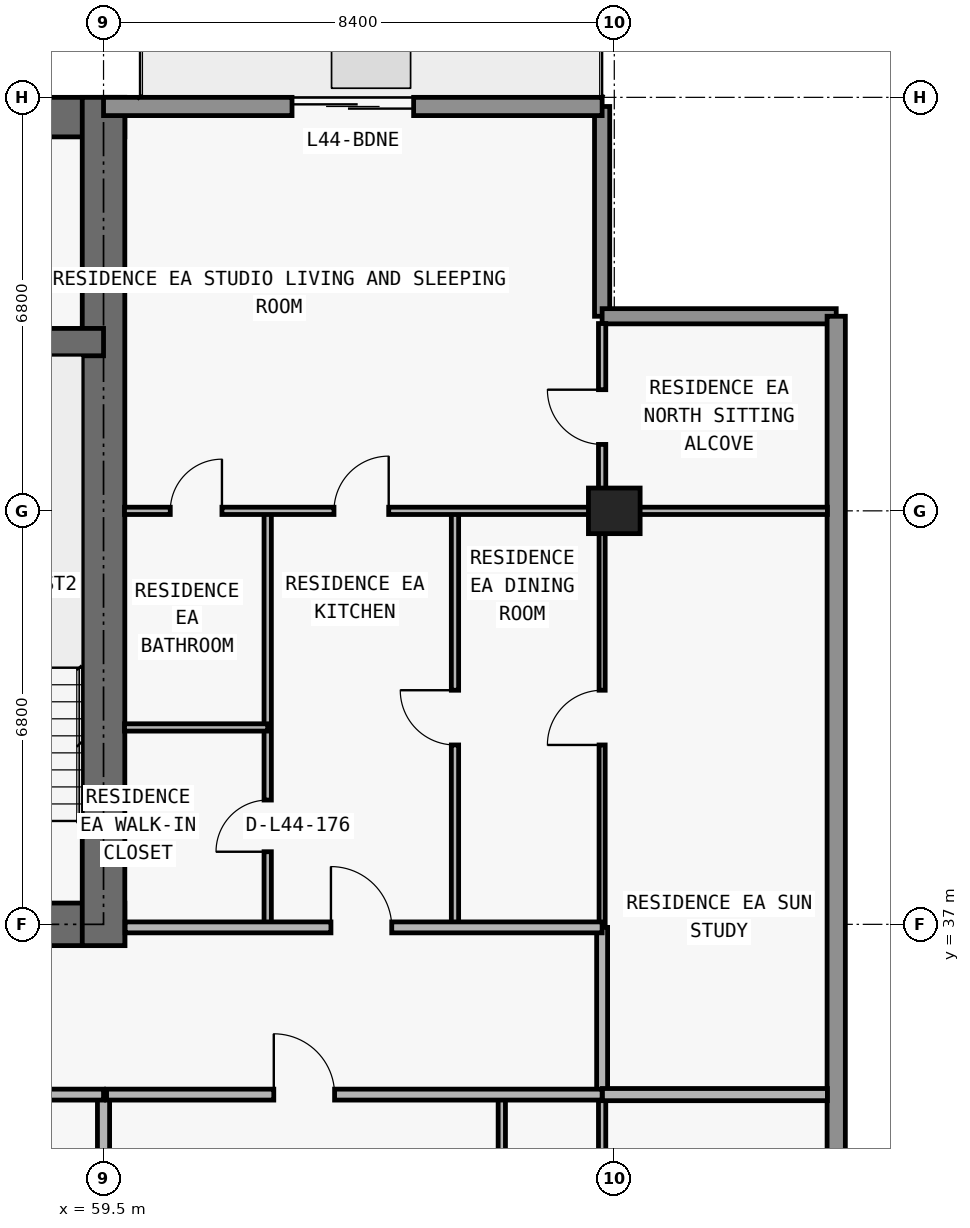
"""IFC4 building model, lengths in metres.
Left out: names, types, materials, properties, quantities, classifications, styles, units other than length and angle.
Written with IfcOpenShell. Run it as: python <this file> out.ifc"""

import sys

from ifc_helpers import new_model, si_unit, direction, frame, frame_2d, origin, origin_2d, place, context, subcontext, project, spatial, rectangle, extrude, element, fill, save


model = new_model("IFC4")
c1 = context("Model", 3, precision=1e-05, world=origin(), true_north=direction((0.0, 1.0)))
c2 = subcontext(c1, "Body", "Model", "MODEL_VIEW")
j1 = project(units=[si_unit("LENGTHUNIT", "METRE"), si_unit("PLANEANGLEUNIT", "RADIAN")], contexts=[c1])
p1 = place(None, origin())
s1 = spatial("IfcSite", under=j1, at=p1, CompositionType="ELEMENT")
p2 = place(p1, origin())
s2 = spatial("IfcBuilding", under=s1, at=p2, CompositionType="ELEMENT")
p3 = place(p2, frame((0.0, 0.0, 160.5)))
s3 = spatial("IfcBuildingStorey", under=s2, at=p3, CompositionType="ELEMENT", Elevation=160.5)
p4 = place(p3, frame((67.9, 43.8, 0.0), z_axis=(0.0, 0.0, 1.0), x_axis=(1.0, 0.0, 0.0)))
e1 = element("IfcColumn", 1, at=p4, inside=s3, PredefinedType="COLUMN", context=c2, shape_type="SweptSolid", body=[
    extrude(rectangle(XDim=0.85, YDim=0.75, at=origin_2d()), origin(), (0.0, 0.0, 1.0), 3.05),
])
p5 = place(p3, frame((17.95, 37.0, 0.0), z_axis=(0.0, 0.0, 1.0), x_axis=(1.0, 0.0, 0.0)))
e2 = element("IfcWall", 2, at=p5, inside=s3, PredefinedType="SHEAR", context=c2, shape_type="SweptSolid", body=[
    extrude(rectangle(XDim=41.9, YDim=0.7, at=frame_2d((20.95, 0.0))), origin(), (0.0, 0.0, 1.0), 3.05),
])
p6 = place(p5, frame((14.35, 0.0, 0.0)))
e3 = element("IfcOpeningElement", 3, at=p6, cuts=e2, PredefinedType="OPENING", context=c2, shape_type="SweptSolid", body=[
    extrude(rectangle(XDim=1.1, YDim=2.15, at=frame_2d((0.55, 1.075))), frame((0.0, 0.36, 0.0), z_axis=(0.0, -1.0, 0.0), x_axis=(1.0, 0.0, 0.0)), (0.0, 0.0, 1.0), 0.72),
])
p7 = place(p5, frame((6.2, 0.0, 0.0)))
e4 = element("IfcOpeningElement", 4, at=p7, cuts=e2, PredefinedType="OPENING", context=c2, shape_type="SweptSolid", body=[
    extrude(rectangle(XDim=1.05, YDim=2.15, at=frame_2d((0.525, 1.075))), frame((0.0, 0.36, 0.0), z_axis=(0.0, -1.0, 0.0), x_axis=(1.0, 0.0, 0.0)), (0.0, 0.0, 1.0), 0.72),
])
p8 = place(p5, frame((34.7, 0.0, 0.0)))
e5 = element("IfcOpeningElement", 5, at=p8, cuts=e2, PredefinedType="OPENING", context=c2, shape_type="SweptSolid", body=[
    extrude(rectangle(XDim=1.05, YDim=2.15, at=frame_2d((0.525, 1.075))), frame((0.0, 0.36, 0.0), z_axis=(0.0, -1.0, 0.0), x_axis=(1.0, 0.0, 0.0)), (0.0, 0.0, 1.0), 0.72),
])
p9 = place(p5, frame((10.812, 0.0, 0.0)))
e6 = element("IfcOpeningElement", 6, at=p9, cuts=e2, PredefinedType="OPENING", context=c2, shape_type="SweptSolid", body=[
    extrude(rectangle(XDim=1.05, YDim=2.15, at=frame_2d((0.525, 1.075))), frame((0.0, 0.36, 0.0), z_axis=(0.0, -1.0, 0.0), x_axis=(1.0, 0.0, 0.0)), (0.0, 0.0, 1.0), 0.72),
])
p10 = place(p5, frame((24.05, 0.0, 0.0)))
e7 = element("IfcOpeningElement", 7, at=p10, cuts=e2, PredefinedType="OPENING", context=c2, shape_type="SweptSolid", body=[
    extrude(rectangle(XDim=1.05, YDim=2.15, at=frame_2d((0.525, 1.075))), frame((0.0, 0.36, 0.0), z_axis=(0.0, -1.0, 0.0), x_axis=(1.0, 0.0, 0.0)), (0.0, 0.0, 1.0), 0.72),
])
p11 = place(p3, frame((17.95, 50.275, 0.0), z_axis=(0.0, 0.0, 1.0), x_axis=(1.0, 0.0, 0.0)))
e8 = element("IfcWall", 8, at=p11, inside=s3, PredefinedType="SHEAR", context=c2, shape_type="SweptSolid", body=[
    extrude(rectangle(XDim=41.9, YDim=0.65, at=frame_2d((20.95, 0.0))), origin(), (0.0, 0.0, 1.0), 3.05),
])
p12 = place(p3, frame((59.5, 36.65, 0.0), z_axis=(0.0, 0.0, 1.0), x_axis=(0.0, 1.0, 0.0)))
e9 = element("IfcWall", 9, at=p12, inside=s3, PredefinedType="SHEAR", context=c2, shape_type="SweptSolid", body=[
    extrude(rectangle(XDim=13.95, YDim=0.7, at=frame_2d((6.975, 0.0))), origin(), (0.0, 0.0, 1.0), 3.05),
])
p13 = place(p3, frame((18.3, 46.575, 0.0), z_axis=(0.0, 0.0, 1.0), x_axis=(1.0, 0.0, 0.0)))
e10 = element("IfcWall", 10, at=p13, inside=s3, PredefinedType="SHEAR", context=c2, shape_type="SweptSolid", body=[
    extrude(rectangle(XDim=41.2, YDim=0.45, at=frame_2d((20.6, 0.0))), origin(), (0.0, 0.0, 1.0), 3.05),
])
p14 = place(p13, frame((7.6, 0.0, 0.0)))
e11 = element("IfcOpeningElement", 11, at=p14, cuts=e10, PredefinedType="OPENING", context=c2, shape_type="SweptSolid", body=[
    extrude(rectangle(XDim=1.0, YDim=2.2, at=frame_2d((0.5, 1.1))), frame((0.0, 0.235, 0.0), z_axis=(0.0, -1.0, 0.0), x_axis=(1.0, 0.0, 0.0)), (0.0, 0.0, 1.0), 0.47),
])
p15 = place(p13, frame((32.625, 0.0, 0.0)))
e12 = element("IfcOpeningElement", 12, at=p15, cuts=e10, PredefinedType="OPENING", context=c2, shape_type="SweptSolid", body=[
    extrude(rectangle(XDim=1.05, YDim=2.15, at=frame_2d((0.525, 1.075))), frame((0.0, 0.235, 0.0), z_axis=(0.0, -1.0, 0.0), x_axis=(1.0, 0.0, 0.0)), (0.0, 0.0, 1.0), 0.47),
])
p16 = place(p3, frame((67.7, 50.45, 0.0), z_axis=(0.0, 0.0, 1.0), x_axis=(0.0, -1.0, 0.0)))
e13 = element("IfcWall", 13, at=p16, inside=s3, PredefinedType="ELEMENTEDWALL", context=c2, shape_type="SweptSolid", body=[
    extrude(rectangle(XDim=3.45, YDim=0.25, at=frame_2d((1.725, 0.0))), origin(), (0.0, 0.0, 1.0), 3.05),
])
p17 = place(p3, frame((67.7, 47.0, 0.0), z_axis=(0.0, 0.0, 1.0), x_axis=(1.0, 0.0, 0.0)))
e14 = element("IfcWall", 14, at=p17, inside=s3, PredefinedType="ELEMENTEDWALL", context=c2, shape_type="SweptSolid", body=[
    extrude(rectangle(XDim=3.85, YDim=0.25, at=frame_2d((1.925, 0.0))), origin(), (0.0, 0.0, 1.0), 3.05),
])
p18 = place(p3, frame((71.55, 47.0, 0.0), z_axis=(0.0, 0.0, 1.0), x_axis=(0.0, -1.0, 0.0)))
e15 = element("IfcWall", 15, at=p18, inside=s3, PredefinedType="STANDARD", context=c2, shape_type="SweptSolid", body=[
    extrude(rectangle(XDim=17.9, YDim=0.3, at=frame_2d((8.95, 0.0))), origin(), (0.0, 0.0, 1.0), 3.05),
])
p19 = place(p3, frame((59.5, 50.45, 0.0), z_axis=(0.0, 0.0, 1.0), x_axis=(1.0, 0.0, 0.0)))
e16 = element("IfcWall", 16, at=p19, inside=s3, PredefinedType="STANDARD", context=c2, shape_type="SweptSolid", body=[
    extrude(rectangle(XDim=8.2, YDim=0.3, at=frame_2d((4.1, 0.0))), origin(), (0.0, 0.0, 1.0), 3.05),
])
p20 = place(p19, frame((3.1, 0.0, 0.0)))
e17 = element("IfcOpeningElement", 17, at=p20, cuts=e16, PredefinedType="OPENING", context=c2, shape_type="SweptSolid", body=[
    extrude(rectangle(XDim=2.0, YDim=2.3, at=frame_2d((1.0, 1.15))), frame((0.0, 0.16, 0.0), z_axis=(0.0, -1.0, 0.0), x_axis=(1.0, 0.0, 0.0)), (0.0, 0.0, 1.0), 0.32),
])
p21 = place(p3, frame((59.5, 27.64, 0.0), z_axis=(0.0, 0.0, 1.0), x_axis=(0.0, 1.0, 0.0)))
e18 = element("IfcWall", 18, at=p21, inside=s3, PredefinedType="PARTITIONING", context=c2, shape_type="SweptSolid", body=[
    extrude(rectangle(XDim=6.56, YDim=0.2, at=frame_2d((3.28, 0.0))), origin(), (0.0, 0.0, 1.0), 2.263),
])
p22 = place(p3, frame((62.2, 37.0, 0.0), z_axis=(0.0, 0.0, 1.0), x_axis=(0.0, 1.0, 0.0)))
e19 = element("IfcWall", 19, at=p22, inside=s3, PredefinedType="PARTITIONING", context=c2, shape_type="SweptSolid", body=[
    extrude(rectangle(XDim=6.8, YDim=0.12, at=frame_2d((3.4, 0.0))), origin(), (0.0, 0.0, 1.0), 2.578),
])
p23 = place(p22, frame((1.194, 0.0, 0.0)))
e20 = element("IfcOpeningElement", 20, at=p23, cuts=e19, PredefinedType="OPENING", context=c2, shape_type="SweptSolid", body=[
    extrude(rectangle(XDim=0.85, YDim=2.1, at=frame_2d((0.425, 1.05))), frame((0.0, 0.07, 0.0), z_axis=(0.0, -1.0, 0.0), x_axis=(1.0, 0.0, 0.0)), (0.0, 0.0, 1.0), 0.14),
])
p24 = place(p3, frame((65.28, 37.0, 0.0), z_axis=(0.0, 0.0, 1.0), x_axis=(0.0, 1.0, 0.0)))
e21 = element("IfcWall", 21, at=p24, inside=s3, PredefinedType="PARTITIONING", context=c2, shape_type="SweptSolid", body=[
    extrude(rectangle(XDim=6.8, YDim=0.12, at=frame_2d((3.4, 0.0))), origin(), (0.0, 0.0, 1.0), 2.679),
])
p25 = place(p24, frame((2.95, 0.0, 0.0)))
e22 = element("IfcOpeningElement", 22, at=p25, cuts=e21, PredefinedType="OPENING", context=c2, shape_type="SweptSolid", body=[
    extrude(rectangle(XDim=0.9, YDim=2.15, at=frame_2d((0.45, 1.075))), frame((0.0, 0.07, 0.0), z_axis=(0.0, -1.0, 0.0), x_axis=(1.0, 0.0, 0.0)), (0.0, 0.0, 1.0), 0.14),
])
p26 = place(p3, frame((66.05, 27.64, 0.0), z_axis=(0.0, 0.0, 1.0), x_axis=(0.0, 1.0, 0.0)))
e23 = element("IfcWall", 23, at=p26, inside=s3, PredefinedType="PARTITIONING", context=c2, shape_type="SweptSolid", body=[
    extrude(rectangle(XDim=6.56, YDim=0.12, at=frame_2d((3.28, 0.0))), origin(), (0.0, 0.0, 1.0), 3.05),
])
p27 = place(p26, frame((2.855, 0.0, 0.0)))
e24 = element("IfcOpeningElement", 24, at=p27, cuts=e23, PredefinedType="OPENING", context=c2, shape_type="SweptSolid", body=[
    extrude(rectangle(XDim=0.85, YDim=2.1, at=frame_2d((0.425, 1.05))), frame((0.0, 0.07, 0.0), z_axis=(0.0, -1.0, 0.0), x_axis=(1.0, 0.0, 0.0)), (0.0, 0.0, 1.0), 0.14),
])
p28 = place(p3, frame((67.7, 27.64, 0.0), z_axis=(0.0, 0.0, 1.0), x_axis=(0.0, 1.0, 0.0)))
e25 = element("IfcWall", 25, at=p28, inside=s3, PredefinedType="PARTITIONING", context=c2, shape_type="SweptSolid", body=[
    extrude(rectangle(XDim=6.56, YDim=0.12, at=frame_2d((3.28, 0.0))), origin(), (0.0, 0.0, 1.0), 2.263),
])
p29 = place(p3, frame((67.7, 34.205, 0.0), z_axis=(0.0, 0.0, 1.0), x_axis=(0.0, 1.0, 0.0)))
e26 = element("IfcWall", 26, at=p29, inside=s3, PredefinedType="PARTITIONING", context=c2, shape_type="SweptSolid", body=[
    extrude(rectangle(XDim=2.745, YDim=0.18, at=frame_2d((1.373, 0.0))), origin(), (0.0, 0.0, 1.0), 2.263),
])
p30 = place(p3, frame((67.7, 37.0, 0.0), z_axis=(0.0, 0.0, 1.0), x_axis=(0.0, 1.0, 0.0)))
e27 = element("IfcWall", 27, at=p30, inside=s3, PredefinedType="MOVABLE", context=c2, shape_type="SweptSolid", body=[
    extrude(rectangle(XDim=6.8, YDim=0.1, at=frame_2d((3.4, 0.0))), origin(), (0.0, 0.0, 1.0), 2.263),
])
p31 = place(p30, frame((2.95, 0.0, 0.0)))
e28 = element("IfcOpeningElement", 28, at=p31, cuts=e27, PredefinedType="OPENING", context=c2, shape_type="SweptSolid", body=[
    extrude(rectangle(XDim=0.9, YDim=2.15, at=frame_2d((0.45, 1.075))), frame((0.0, 0.06, 0.0), z_axis=(0.0, -1.0, 0.0), x_axis=(1.0, 0.0, 0.0)), (0.0, 0.0, 1.0), 0.12),
])
p32 = place(p3, frame((67.7, 43.805, 0.0), z_axis=(0.0, 0.0, 1.0), x_axis=(0.0, 1.0, 0.0)))
e29 = element("IfcWall", 29, at=p32, inside=s3, PredefinedType="PARTITIONING", context=c2, shape_type="SweptSolid", body=[
    extrude(rectangle(XDim=3.075, YDim=0.12, at=frame_2d((1.538, 0.0))), origin(), (0.0, 0.0, 1.0), 3.05),
])
p33 = place(p32, frame((1.087, 0.0, 0.0)))
e30 = element("IfcOpeningElement", 30, at=p33, cuts=e29, PredefinedType="OPENING", context=c2, shape_type="SweptSolid", body=[
    extrude(rectangle(XDim=0.9, YDim=2.15, at=frame_2d((0.45, 1.075))), frame((0.0, 0.07, 0.0), z_axis=(0.0, -1.0, 0.0), x_axis=(1.0, 0.0, 0.0)), (0.0, 0.0, 1.0), 0.14),
])
p34 = place(p3, frame((55.9, 34.2, 0.0), z_axis=(0.0, 0.0, 1.0), x_axis=(1.0, 0.0, 0.0)))
e31 = element("IfcWall", 31, at=p34, inside=s3, PredefinedType="PARTITIONING", context=c2, shape_type="SweptSolid", body=[
    extrude(rectangle(XDim=3.6, YDim=0.18, at=frame_2d((1.8, 0.0))), origin(), (0.0, 0.0, 1.0), 3.05),
])
p35 = place(p3, frame((59.55, 34.2, 0.0), z_axis=(0.0, 0.0, 1.0), x_axis=(1.0, 0.0, 0.0)))
e32 = element("IfcWall", 32, at=p35, inside=s3, PredefinedType="PARTITIONING", context=c2, shape_type="SweptSolid", body=[
    extrude(rectangle(XDim=8.15, YDim=0.18, at=frame_2d((4.075, 0.0))), origin(), (0.0, 0.0, 1.0), 3.05),
])
p36 = place(p35, frame((2.75, 0.0, 0.0)))
e33 = element("IfcOpeningElement", 33, at=p36, cuts=e32, PredefinedType="OPENING", context=c2, shape_type="SweptSolid", body=[
    extrude(rectangle(XDim=1.0, YDim=2.2, at=frame_2d((0.5, 1.1))), frame((0.0, 0.1, 0.0), z_axis=(0.0, -1.0, 0.0), x_axis=(1.0, 0.0, 0.0)), (0.0, 0.0, 1.0), 0.2),
])
p37 = place(p3, frame((67.705, 34.2, 0.0), z_axis=(0.0, 0.0, 1.0), x_axis=(1.0, 0.0, 0.0)))
e34 = element("IfcWall", 34, at=p37, inside=s3, PredefinedType="PARTITIONING", context=c2, shape_type="SweptSolid", body=[
    extrude(rectangle(XDim=3.7, YDim=0.2, at=frame_2d((1.85, 0.0))), origin(), (0.0, 0.0, 1.0), 3.05),
])
p38 = place(p3, frame((59.855, 36.95, 0.0), z_axis=(0.0, 0.0, 1.0), x_axis=(1.0, 0.0, 0.0)))
e35 = element("IfcWall", 35, at=p38, inside=s3, PredefinedType="PARTITIONING", context=c2, shape_type="SweptSolid", body=[
    extrude(rectangle(XDim=7.845, YDim=0.18, at=frame_2d((3.922, 0.0))), origin(), (0.0, 0.0, 1.0), 3.05),
])
p39 = place(p38, frame((3.385, 0.0, 0.0)))
e36 = element("IfcOpeningElement", 36, at=p39, cuts=e35, PredefinedType="OPENING", context=c2, shape_type="SweptSolid", body=[
    extrude(rectangle(XDim=1.0, YDim=2.2, at=frame_2d((0.5, 1.1))), frame((0.0, 0.1, 0.0), z_axis=(0.0, -1.0, 0.0), x_axis=(1.0, 0.0, 0.0)), (0.0, 0.0, 1.0), 0.2),
])
p40 = place(p3, frame((59.845, 40.238, 0.0), z_axis=(0.0, 0.0, 1.0), x_axis=(1.0, 0.0, 0.0)))
e37 = element("IfcWall", 37, at=p40, inside=s3, PredefinedType="PARTITIONING", context=c2, shape_type="SweptSolid", body=[
    extrude(rectangle(XDim=2.355, YDim=0.12, at=frame_2d((1.177, 0.0))), origin(), (0.0, 0.0, 1.0), 3.05),
])
p41 = place(p3, frame((59.845, 43.8, 0.0), z_axis=(0.0, 0.0, 1.0), x_axis=(1.0, 0.0, 0.0)))
e38 = element("IfcWall", 38, at=p41, inside=s3, PredefinedType="PARTITIONING", context=c2, shape_type="SweptSolid", body=[
    extrude(rectangle(XDim=11.56, YDim=0.12, at=frame_2d((5.78, 0.0))), origin(), (0.0, 0.0, 1.0), 2.418),
])
p42 = place(p41, frame((3.445, 0.0, 0.0)))
e39 = element("IfcOpeningElement", 39, at=p42, cuts=e38, PredefinedType="OPENING", context=c2, shape_type="SweptSolid", body=[
    extrude(rectangle(XDim=0.9, YDim=2.15, at=frame_2d((0.45, 1.075))), frame((0.0, 0.07, 0.0), z_axis=(0.0, -1.0, 0.0), x_axis=(1.0, 0.0, 0.0)), (0.0, 0.0, 1.0), 0.14),
])
p43 = place(p41, frame((0.752, 0.0, 0.0)))
e40 = element("IfcOpeningElement", 40, at=p43, cuts=e38, PredefinedType="OPENING", context=c2, shape_type="SweptSolid", body=[
    extrude(rectangle(XDim=0.85, YDim=2.1, at=frame_2d((0.425, 1.05))), frame((0.0, 0.07, 0.0), z_axis=(0.0, -1.0, 0.0), x_axis=(1.0, 0.0, 0.0)), (0.0, 0.0, 1.0), 0.14),
])
p44 = place(p20, origin())
e41 = element("IfcDoor", 41, at=p44, inside=s3, OperationType="DOUBLE_DOOR_SLIDING", PredefinedType="DOOR", context=c2, shape_type="SweptSolid", body=[
    extrude(rectangle(XDim=2.0, YDim=2.3, at=frame_2d((1.0, 1.15))), frame((0.0, 0.025, 0.0), z_axis=(0.0, -1.0, 0.0), x_axis=(1.0, 0.0, 0.0)), (0.0, 0.0, 1.0), 0.05),
])
fill(e17, e41)
p45 = place(p36, origin())
e42 = element("IfcDoor", 42, at=p45, inside=s3, OperationType="SINGLE_SWING_LEFT", PredefinedType="DOOR", context=c2, shape_type="SweptSolid", body=[
    extrude(rectangle(XDim=1.0, YDim=2.2, at=frame_2d((0.5, 1.1))), frame((0.0, 0.025, 0.0), z_axis=(0.0, -1.0, 0.0), x_axis=(1.0, 0.0, 0.0)), (0.0, 0.0, 1.0), 0.05),
])
fill(e33, e42)
p46 = place(p25, origin())
e43 = element("IfcDoor", 43, at=p46, inside=s3, OperationType="SINGLE_SWING_RIGHT", PredefinedType="DOOR", context=c2, shape_type="SweptSolid", body=[
    extrude(rectangle(XDim=0.9, YDim=2.15, at=frame_2d((0.45, 1.075))), frame((0.0, 0.025, 0.0), z_axis=(0.0, -1.0, 0.0), x_axis=(1.0, 0.0, 0.0)), (0.0, 0.0, 1.0), 0.05),
])
fill(e22, e43)
p47 = place(p39, origin())
e44 = element("IfcDoor", 44, at=p47, inside=s3, OperationType="SINGLE_SWING_LEFT", PredefinedType="DOOR", context=c2, shape_type="SweptSolid", body=[
    extrude(rectangle(XDim=1.0, YDim=2.2, at=frame_2d((0.5, 1.1))), frame((0.0, 0.025, 0.0), z_axis=(0.0, -1.0, 0.0), x_axis=(1.0, 0.0, 0.0)), (0.0, 0.0, 1.0), 0.05),
])
fill(e36, e44)
p48 = place(p42, origin())
e45 = element("IfcDoor", 45, at=p48, inside=s3, OperationType="SINGLE_SWING_RIGHT", PredefinedType="DOOR", context=c2, shape_type="SweptSolid", body=[
    extrude(rectangle(XDim=0.9, YDim=2.15, at=frame_2d((0.45, 1.075))), frame((0.0, 0.025, 0.0), z_axis=(0.0, -1.0, 0.0), x_axis=(1.0, 0.0, 0.0)), (0.0, 0.0, 1.0), 0.05),
])
fill(e39, e45)
p49 = place(p23, origin())
e46 = element("IfcDoor", 46, at=p49, inside=s3, OperationType="SINGLE_SWING_LEFT", PredefinedType="DOOR", context=c2, shape_type="SweptSolid", body=[
    extrude(rectangle(XDim=0.85, YDim=2.1, at=frame_2d((0.425, 1.05))), frame((0.0, 0.025, 0.0), z_axis=(0.0, -1.0, 0.0), x_axis=(1.0, 0.0, 0.0)), (0.0, 0.0, 1.0), 0.05),
])
fill(e20, e46)
p50 = place(p43, origin())
e47 = element("IfcDoor", 47, at=p50, inside=s3, OperationType="SINGLE_SWING_RIGHT", PredefinedType="DOOR", context=c2, shape_type="SweptSolid", body=[
    extrude(rectangle(XDim=0.85, YDim=2.1, at=frame_2d((0.425, 1.05))), frame((0.0, 0.025, 0.0), z_axis=(0.0, -1.0, 0.0), x_axis=(1.0, 0.0, 0.0)), (0.0, 0.0, 1.0), 0.05),
])
fill(e40, e47)
p51 = place(p31, origin())
e48 = element("IfcDoor", 48, at=p51, inside=s3, OperationType="SINGLE_SWING_LEFT", PredefinedType="DOOR", context=c2, shape_type="SweptSolid", body=[
    extrude(rectangle(XDim=0.9, YDim=2.15, at=frame_2d((0.45, 1.075))), frame((0.0, 0.025, 0.0), z_axis=(0.0, -1.0, 0.0), x_axis=(1.0, 0.0, 0.0)), (0.0, 0.0, 1.0), 0.05),
])
fill(e28, e48)
p52 = place(p33, origin())
e49 = element("IfcDoor", 49, at=p52, inside=s3, OperationType="SINGLE_SWING_RIGHT", PredefinedType="DOOR", context=c2, shape_type="SweptSolid", body=[
    extrude(rectangle(XDim=0.9, YDim=2.15, at=frame_2d((0.45, 1.075))), frame((0.0, 0.025, 0.0), z_axis=(0.0, -1.0, 0.0), x_axis=(1.0, 0.0, 0.0)), (0.0, 0.0, 1.0), 0.05),
])
fill(e30, e49)
save(model, sys.argv[1])
